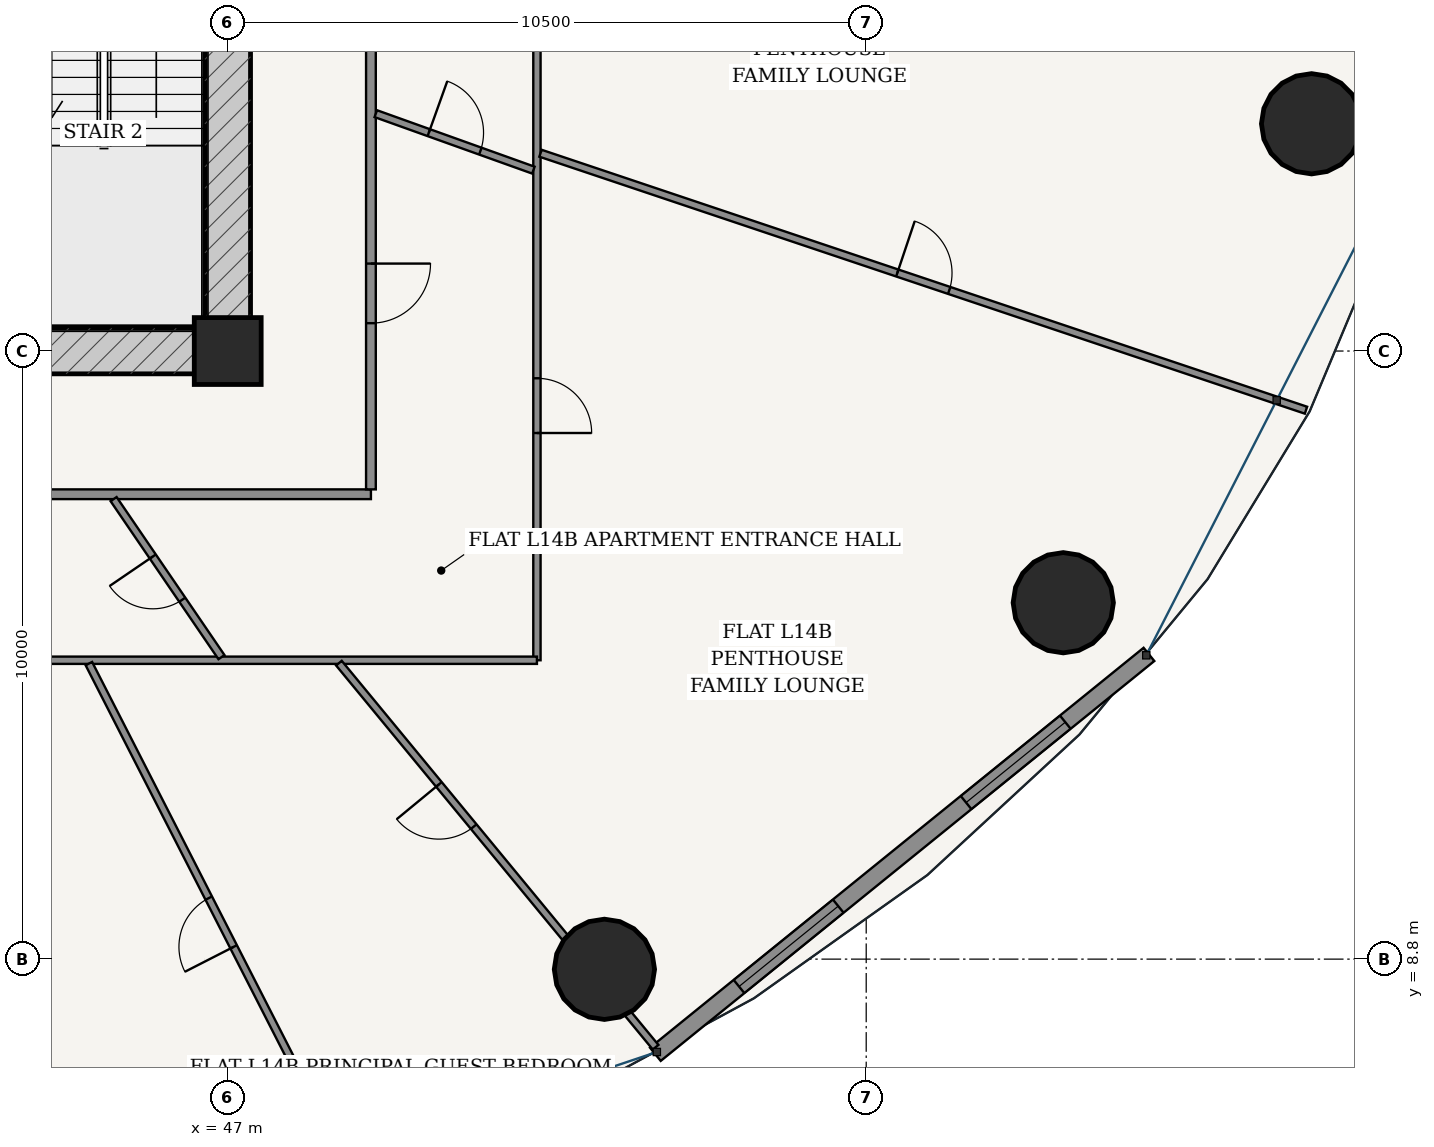
"""IFC4 building model, lengths in metres.
Left out: names, types, materials, properties, quantities, classifications, styles, units other than length and angle.
Written with IfcOpenShell. Run it as: python <this file> out.ifc"""

import sys

from ifc_helpers import new_model, si_unit, direction, frame, frame_2d, origin, origin_2d, place, context, subcontext, project, spatial, rectangle, hollow_circle, extrude, source, transform, mapped, element, fill, save


model = new_model("IFC4")
c1 = context("Model", 3, precision=1e-05, world=origin(), true_north=direction((-0.2419218956, 0.970295726276)))
c2 = subcontext(c1, "Body", "Model", "MODEL_VIEW")
j1 = project(units=[si_unit("LENGTHUNIT", "METRE"), si_unit("PLANEANGLEUNIT", "RADIAN")], contexts=[c1])
p1 = place(None, origin())
s1 = spatial("IfcSite", under=j1, at=p1, CompositionType="ELEMENT")
p2 = place(p1, origin())
s2 = spatial("IfcBuilding", under=s1, at=p2, CompositionType="ELEMENT")
p3 = place(p2, frame((0.0, 0.0, 56.4)))
s3 = spatial("IfcBuildingStorey", under=s2, at=p3, CompositionType="ELEMENT", Elevation=56.4)
p4 = place(p3, frame((47.0, 18.8, 0.0), z_axis=(0.0, 0.0, 1.0), x_axis=(1.0, 0.0, 0.0)))
e1 = element("IfcColumn", 1, at=p4, inside=s3, PredefinedType="COLUMN", context=c2, shape_type="SweptSolid", body=[
    extrude(rectangle(XDim=1.1, YDim=1.1, at=origin_2d()), origin(), (0.0, 0.0, 1.0), 3.6),
])
p5 = place(p3, frame((28.625, 18.8, 0.0), z_axis=(0.0, 0.0, 1.0), x_axis=(1.0, 0.0, 0.0)))
e2 = element("IfcWall", 2, at=p5, inside=s3, PredefinedType="SHEAR", context=c2, shape_type="SweptSolid", body=[
    extrude(rectangle(XDim=18.75, YDim=0.75, at=frame_2d((9.375, 0.0))), origin(), (0.0, 0.0, 1.0), 3.32),
])
p6 = place(p5, frame((8.95, 0.0, 0.0)))
e3 = element("IfcOpeningElement", 3, at=p6, cuts=e2, PredefinedType="OPENING", context=c2, shape_type="SweptSolid", body=[
    extrude(rectangle(XDim=0.85, YDim=2.1, at=frame_2d((0.425, 1.05))), frame((0.0, 0.385, 0.0), z_axis=(0.0, -1.0, 0.0), x_axis=(1.0, 0.0, 0.0)), (0.0, 0.0, 1.0), 0.77),
])
p7 = place(p3, frame((47.0, 19.175, 0.0), z_axis=(0.0, 0.0, 1.0), x_axis=(0.0, 1.0, 0.0)))
e4 = element("IfcWall", 4, at=p7, inside=s3, PredefinedType="SHEAR", context=c2, shape_type="SweptSolid", body=[
    extrude(rectangle(XDim=15.25, YDim=0.75, at=frame_2d((7.625, 0.0))), origin(), (0.0, 0.0, 1.0), 3.32),
])
p8 = place(p7, frame((9.875, 0.0, 0.0)))
e5 = element("IfcOpeningElement", 5, at=p8, cuts=e4, PredefinedType="OPENING", context=c2, shape_type="SweptSolid", body=[
    extrude(rectangle(XDim=1.5, YDim=2.2, at=frame_2d((0.75, 1.1))), frame((0.0, 0.385, 0.0), z_axis=(0.0, -1.0, 0.0), x_axis=(1.0, 0.0, 0.0)), (0.0, 0.0, 1.0), 0.77),
])
for number, where, z_axis, x_axis in (
    (6, (53.195, 8.632, 0.0), (0.0, 0.0, 1.0), (1.0, 0.0, 0.0)),
    (7, (60.741, 14.661, 0.0), (0.0, 0.0, 1.0), (1.0, 0.0, 0.0)),
    (8, (64.824, 22.537, 0.0), (0.0, 0.0, 1.0), (1.0, 0.0, 0.0)),
):
    element("IfcColumn", number, at=place(p3, frame(where, z_axis=z_axis, x_axis=x_axis)), inside=s3, PredefinedType="COLUMN", context=c2, shape_type="SweptSolid", body=[
        extrude(hollow_circle(Radius=0.825, WallThickness=0.05, at=origin_2d()), origin(), (0.0, 0.0, 1.0), 3.6),
    ])
p9 = place(p3, frame((54.033, 7.235, 0.0), z_axis=(0.0, 0.0, 1.0), x_axis=(0.777016782851, 0.629479879875, 0.0)))
e9 = element("IfcWall", 9, at=p9, inside=s3, PredefinedType="SOLIDWALL", context=c2, shape_type="SweptSolid", body=[
    extrude(rectangle(XDim=10.447, YDim=0.28, at=frame_2d((5.223, 0.0))), origin(), (0.0, 0.0, 1.0), 3.32),
])
p10 = place(p9, frame((1.771, 0.0, 0.85)))
e10 = element("IfcOpeningElement", 10, at=p10, cuts=e9, PredefinedType="OPENING", context=c2, shape_type="SweptSolid", body=[
    extrude(rectangle(XDim=2.1, YDim=1.95, at=frame_2d((1.05, 0.975))), frame((0.0, 0.15, 0.0), z_axis=(0.0, -1.0, 0.0), x_axis=(1.0, 0.0, 0.0)), (0.0, 0.0, 1.0), 0.3),
])
p11 = place(p9, frame((6.576, 0.0, 0.85)))
e11 = element("IfcOpeningElement", 11, at=p11, cuts=e9, PredefinedType="OPENING", context=c2, shape_type="SweptSolid", body=[
    extrude(rectangle(XDim=2.1, YDim=1.95, at=frame_2d((1.05, 0.975))), frame((0.0, 0.15, 0.0), z_axis=(0.0, -1.0, 0.0), x_axis=(1.0, 0.0, 0.0)), (0.0, 0.0, 1.0), 0.3),
])
p12 = place(p3, frame((26.645, 16.445, 0.0), z_axis=(0.0, 0.0, 1.0), x_axis=(1.0, 0.0, 0.0)))
e12 = element("IfcWall", 12, at=p12, inside=s3, PredefinedType="PARTITIONING", context=c2, shape_type="SweptSolid", body=[
    extrude(rectangle(XDim=22.71, YDim=0.16, at=frame_2d((11.355, 0.0))), origin(), (0.0, 0.0, 1.0), 2.688),
])
p13 = place(p3, frame((49.355, 16.525, 0.0), z_axis=(0.0, 0.0, 1.0), x_axis=(0.0, 1.0, 0.0)))
e13 = element("IfcWall", 13, at=p13, inside=s3, PredefinedType="PARTITIONING", context=c2, shape_type="SweptSolid", body=[
    extrude(rectangle(XDim=20.55, YDim=0.16, at=frame_2d((10.275, 0.0))), origin(), (0.0, 0.0, 1.0), 2.688),
])
p14 = place(p13, frame((2.733, 0.0, 0.0)))
e14 = element("IfcOpeningElement", 14, at=p14, cuts=e13, PredefinedType="OPENING", context=c2, shape_type="SweptSolid", body=[
    extrude(rectangle(XDim=0.98, YDim=2.2, at=frame_2d((0.49, 1.1))), frame((0.0, 0.09, 0.0), z_axis=(0.0, -1.0, 0.0), x_axis=(1.0, 0.0, 0.0)), (0.0, 0.0, 1.0), 0.18),
])
p15 = place(p3, frame((52.085, 34.324, 0.0), z_axis=(0.0, 0.0, 1.0), x_axis=(0.0, -1.0, 0.0)))
e15 = element("IfcWall", 15, at=p15, inside=s3, PredefinedType="PARTITIONING", context=c2, shape_type="SweptSolid", body=[
    extrude(rectangle(XDim=20.609, YDim=0.12, at=frame_2d((10.305, 0.0))), origin(), (0.0, 0.0, 1.0), 2.688),
])
p16 = place(p15, frame((15.972, 0.0, 0.0)))
e16 = element("IfcOpeningElement", 16, at=p16, cuts=e15, PredefinedType="OPENING", context=c2, shape_type="SweptSolid", body=[
    extrude(rectangle(XDim=0.9, YDim=2.15, at=frame_2d((0.45, 1.075))), frame((0.0, 0.07, 0.0), z_axis=(0.0, -1.0, 0.0), x_axis=(1.0, 0.0, 0.0)), (0.0, 0.0, 1.0), 0.14),
])
p17 = place(p15, frame((3.058, 0.0, 0.0)))
e17 = element("IfcOpeningElement", 17, at=p17, cuts=e15, PredefinedType="OPENING", context=c2, shape_type="SweptSolid", body=[
    extrude(rectangle(XDim=0.9, YDim=2.15, at=frame_2d((0.45, 1.075))), frame((0.0, 0.07, 0.0), z_axis=(0.0, -1.0, 0.0), x_axis=(1.0, 0.0, 0.0)), (0.0, 0.0, 1.0), 0.14),
])
p18 = place(p3, frame((52.085, 13.715, 0.0), z_axis=(0.0, 0.0, 1.0), x_axis=(-1.0, 0.0, 0.0)))
e18 = element("IfcWall", 18, at=p18, inside=s3, PredefinedType="PARTITIONING", context=c2, shape_type="SweptSolid", body=[
    extrude(rectangle(XDim=28.17, YDim=0.12, at=frame_2d((14.085, 0.0))), origin(), (0.0, 0.0, 1.0), 2.688),
])
p19 = place(p18, frame((12.891, 0.0, 0.0)))
e19 = element("IfcOpeningElement", 19, at=p19, cuts=e18, PredefinedType="OPENING", context=c2, shape_type="SweptSolid", body=[
    extrude(rectangle(XDim=0.9, YDim=2.15, at=frame_2d((0.45, 1.075))), frame((0.0, 0.07, 0.0), z_axis=(0.0, -1.0, 0.0), x_axis=(1.0, 0.0, 0.0)), (0.0, 0.0, 1.0), 0.14),
])
p20 = place(p3, frame((44.717, 13.66, 0.0), z_axis=(0.0, 0.0, 1.0), x_axis=(0.455131303234, -0.890424335256, 0.0)))
e20 = element("IfcWall", 20, at=p20, inside=s3, PredefinedType="PARTITIONING", context=c2, shape_type="SweptSolid", body=[
    extrude(rectangle(XDim=9.562, YDim=0.12, at=frame_2d((4.781, 0.0))), origin(), (0.0, 0.0, 1.0), 2.762),
])
p21 = place(p20, frame((4.331, 0.0, 0.0)))
e21 = element("IfcOpeningElement", 21, at=p21, cuts=e20, PredefinedType="OPENING", context=c2, shape_type="SweptSolid", body=[
    extrude(rectangle(XDim=0.9, YDim=2.15, at=frame_2d((0.45, 1.075))), frame((0.0, 0.07, 0.0), z_axis=(0.0, -1.0, 0.0), x_axis=(1.0, 0.0, 0.0)), (0.0, 0.0, 1.0), 0.14),
])
p22 = place(p3, frame((48.829, 13.667, 0.0), z_axis=(0.0, 0.0, 1.0), x_axis=(0.636177533893, -0.771542704826, 0.0)))
e22 = element("IfcWall", 22, at=p22, inside=s3, PredefinedType="PARTITIONING", context=c2, shape_type="SweptSolid", body=[
    extrude(rectangle(XDim=8.187, YDim=0.12, at=frame_2d((4.093, 0.0))), origin(), (0.0, 0.0, 1.0), 2.688),
])
p23 = place(p22, frame((2.584, 0.0, 0.0)))
e23 = element("IfcOpeningElement", 23, at=p23, cuts=e22, PredefinedType="OPENING", context=c2, shape_type="SweptSolid", body=[
    extrude(rectangle(XDim=0.9, YDim=2.15, at=frame_2d((0.45, 1.075))), frame((0.0, 0.07, 0.0), z_axis=(0.0, -1.0, 0.0), x_axis=(1.0, 0.0, 0.0)), (0.0, 0.0, 1.0), 0.14),
])
p24 = place(p3, frame((52.144, 22.052, 0.0), z_axis=(0.0, 0.0, 1.0), x_axis=(0.948023034133, -0.318201707653, 0.0)))
e24 = element("IfcWall", 24, at=p24, inside=s3, PredefinedType="PARTITIONING", context=c2, shape_type="SweptSolid", body=[
    extrude(rectangle(XDim=13.279, YDim=0.12, at=frame_2d((6.639, 0.0))), origin(), (0.0, 0.0, 1.0), 2.762),
])
p25 = place(p24, frame((6.189, 0.0, 0.0)))
e25 = element("IfcOpeningElement", 25, at=p25, cuts=e24, PredefinedType="OPENING", context=c2, shape_type="SweptSolid", body=[
    extrude(rectangle(XDim=0.9, YDim=2.15, at=frame_2d((0.45, 1.075))), frame((0.0, 0.07, 0.0), z_axis=(0.0, -1.0, 0.0), x_axis=(1.0, 0.0, 0.0)), (0.0, 0.0, 1.0), 0.14),
])
p26 = place(p3, frame((45.123, 16.365, 0.0), z_axis=(0.0, 0.0, 1.0), x_axis=(0.563762888243, -0.825936683917, 0.0)))
e26 = element("IfcWall", 26, at=p26, inside=s3, PredefinedType="PARTITIONING", context=c2, shape_type="SweptSolid", body=[
    extrude(rectangle(XDim=3.146, YDim=0.12, at=frame_2d((1.573, 0.0))), origin(), (0.0, 0.0, 1.0), 3.32),
])
p27 = place(p26, frame((1.143, 0.0, 0.0)))
e27 = element("IfcOpeningElement", 27, at=p27, cuts=e26, PredefinedType="OPENING", context=c2, shape_type="SweptSolid", body=[
    extrude(rectangle(XDim=0.86, YDim=2.15, at=frame_2d((0.43, 1.075))), frame((0.0, 0.07, 0.0), z_axis=(0.0, -1.0, 0.0), x_axis=(1.0, 0.0, 0.0)), (0.0, 0.0, 1.0), 0.14),
])
p28 = place(p3, frame((49.435, 22.703, 0.0), z_axis=(0.0, 0.0, 1.0), x_axis=(0.941406362049, -0.337274460186, 0.0)))
e28 = element("IfcWall", 28, at=p28, inside=s3, PredefinedType="PARTITIONING", context=c2, shape_type="SweptSolid", body=[
    extrude(rectangle(XDim=2.753, YDim=0.12, at=frame_2d((1.376, 0.0))), origin(), (0.0, 0.0, 1.0), 3.32),
])
p29 = place(p28, frame((0.927, 0.0, 0.0)))
e29 = element("IfcOpeningElement", 29, at=p29, cuts=e28, PredefinedType="OPENING", context=c2, shape_type="SweptSolid", body=[
    extrude(rectangle(XDim=0.9, YDim=2.15, at=frame_2d((0.45, 1.075))), frame((0.0, 0.07, 0.0), z_axis=(0.0, -1.0, 0.0), x_axis=(1.0, 0.0, 0.0)), (0.0, 0.0, 1.0), 0.14),
])
m1 = source(origin(), c2, "Body", "SweptSolid", [
    extrude(rectangle(XDim=2.1, YDim=1.95, at=frame_2d((1.05, 0.975))), frame((0.0, 0.03, 0.0), z_axis=(0.0, -1.0, 0.0), x_axis=(1.0, 0.0, 0.0)), (0.0, 0.0, 1.0), 0.06),
])
p30 = place(p10, origin())
e30 = element("IfcWindow", 30, at=p30, inside=s3, PartitioningType="SINGLE_PANEL", PredefinedType="WINDOW", context=c2, shape_type="MappedRepresentation", body=[
    mapped(m1, transform((0.0, 0.0, 0.0), scale=1.0)),
])
fill(e10, e30)
p31 = place(p11, origin())
e31 = element("IfcWindow", 31, at=p31, inside=s3, PartitioningType="SINGLE_PANEL", PredefinedType="WINDOW", context=c2, shape_type="MappedRepresentation", body=[
    mapped(m1, transform((0.0, 0.0, 0.0), scale=1.0)),
])
fill(e11, e31)
m2 = source(origin(), c2, "Body", "SweptSolid", [
    extrude(rectangle(XDim=0.98, YDim=2.2, at=frame_2d((0.49, 1.1))), frame((0.0, 0.025, 0.0), z_axis=(0.0, -1.0, 0.0), x_axis=(1.0, 0.0, 0.0)), (0.0, 0.0, 1.0), 0.05),
])
p32 = place(p14, frame((0.98, 0.0, 0.0), z_axis=(0.0, 0.0, 1.0), x_axis=(-1.0, 0.0, 0.0)))
e32 = element("IfcDoor", 32, at=p32, inside=s3, OperationType="SINGLE_SWING_LEFT", PredefinedType="DOOR", context=c2, shape_type="MappedRepresentation", body=[
    mapped(m2, transform((0.0, 0.0, 0.0), scale=1.0)),
])
fill(e14, e32)
m3 = source(origin(), c2, "Body", "SweptSolid", [
    extrude(rectangle(XDim=0.86, YDim=2.15, at=frame_2d((0.43, 1.075))), frame((0.0, 0.025, 0.0), z_axis=(0.0, -1.0, 0.0), x_axis=(1.0, 0.0, 0.0)), (0.0, 0.0, 1.0), 0.05),
])
p33 = place(p27, frame((0.86, 0.0, 0.0), z_axis=(0.0, 0.0, 1.0), x_axis=(-1.0, 0.0, 0.0)))
e33 = element("IfcDoor", 33, at=p33, inside=s3, OperationType="SINGLE_SWING_RIGHT", PredefinedType="DOOR", context=c2, shape_type="MappedRepresentation", body=[
    mapped(m3, transform((0.0, 0.0, 0.0), scale=1.0)),
])
fill(e27, e33)
m4 = source(origin(), c2, "Body", "SweptSolid", [
    extrude(rectangle(XDim=0.9, YDim=2.15, at=frame_2d((0.45, 1.075))), frame((0.0, 0.025, 0.0), z_axis=(0.0, -1.0, 0.0), x_axis=(1.0, 0.0, 0.0)), (0.0, 0.0, 1.0), 0.05),
])
p34 = place(p29, origin())
e34 = element("IfcDoor", 34, at=p34, inside=s3, OperationType="SINGLE_SWING_LEFT", PredefinedType="DOOR", context=c2, shape_type="MappedRepresentation", body=[
    mapped(m4, transform((0.0, 0.0, 0.0), scale=1.0)),
])
fill(e29, e34)
p35 = place(p16, origin())
e35 = element("IfcDoor", 35, at=p35, inside=s3, OperationType="SINGLE_SWING_RIGHT", PredefinedType="DOOR", context=c2, shape_type="MappedRepresentation", body=[
    mapped(m4, transform((0.0, 0.0, 0.0), scale=1.0)),
])
fill(e16, e35)
p36 = place(p25, origin())
e36 = element("IfcDoor", 36, at=p36, inside=s3, OperationType="SINGLE_SWING_LEFT", PredefinedType="DOOR", context=c2, shape_type="MappedRepresentation", body=[
    mapped(m4, transform((0.0, 0.0, 0.0), scale=1.0)),
])
fill(e25, e36)
p37 = place(p23, frame((0.9, 0.0, 0.0), z_axis=(0.0, 0.0, 1.0), x_axis=(-1.0, 0.0, 0.0)))
e37 = element("IfcDoor", 37, at=p37, inside=s3, OperationType="SINGLE_SWING_RIGHT", PredefinedType="DOOR", context=c2, shape_type="MappedRepresentation", body=[
    mapped(m4, transform((0.0, 0.0, 0.0), scale=1.0)),
])
fill(e23, e37)
p38 = place(p21, frame((0.9, 0.0, 0.0), z_axis=(0.0, 0.0, 1.0), x_axis=(-1.0, 0.0, 0.0)))
e38 = element("IfcDoor", 38, at=p38, inside=s3, OperationType="SINGLE_SWING_LEFT", PredefinedType="DOOR", context=c2, shape_type="MappedRepresentation", body=[
    mapped(m4, transform((0.0, 0.0, 0.0), scale=1.0)),
])
fill(e21, e38)
save(model, sys.argv[1])
